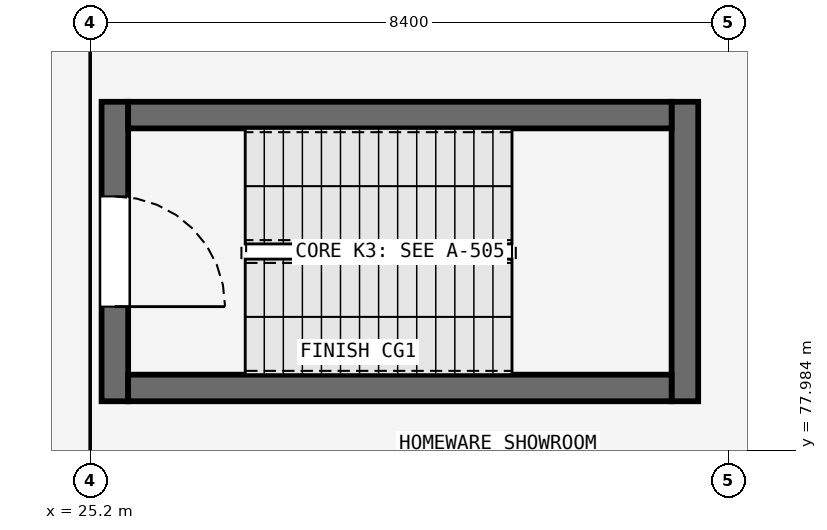
"""IFC4 building model, lengths in metres.
Left out: names, types, materials, properties, quantities, classifications, styles, units other than length and angle.
Written with IfcOpenShell. Run it as: python <this file> out.ifc"""

import sys

from ifc_helpers import new_model, si_unit, direction, frame, frame_2d, origin, place, context, subcontext, project, spatial, rectangle, extrude, element, fill, save


model = new_model("IFC4")
c1 = context("Model", 3, precision=1e-05, world=origin(), true_north=direction((0.0, 1.0)))
c2 = subcontext(c1, "Body", "Model", "MODEL_VIEW")
j1 = project(units=[si_unit("LENGTHUNIT", "METRE"), si_unit("PLANEANGLEUNIT", "RADIAN")], contexts=[c1])
p1 = place(None, origin())
s1 = spatial("IfcSite", under=j1, at=p1, CompositionType="ELEMENT")
p2 = place(p1, origin())
s2 = spatial("IfcBuilding", under=s1, at=p2, CompositionType="ELEMENT")
p3 = place(p2, frame((0.0, 0.0, 18.9)))
s3 = spatial("IfcBuildingStorey", under=s2, at=p3, CompositionType="ELEMENT", Elevation=18.9)
p4 = place(p3, frame((25.525, 82.57, 0.0), z_axis=(0.0, 0.0, 1.0), x_axis=(0.0, -1.0, 0.0)))
e1 = element("IfcWall", 1, at=p4, inside=s3, PredefinedType="SHEAR", context=c2, shape_type="SweptSolid", body=[
    extrude(rectangle(XDim=3.94, YDim=0.35, at=frame_2d((1.97, 0.0))), origin(), (0.0, 0.0, 1.0), 4.2),
])
p5 = place(p4, frame((1.245, 0.0, 0.0)))
e2 = element("IfcOpeningElement", 2, at=p5, cuts=e1, PredefinedType="OPENING", context=c2, shape_type="SweptSolid", body=[
    extrude(rectangle(XDim=1.45, YDim=2.2, at=frame_2d((0.725, 1.1))), frame((0.0, 0.185, 0.0), z_axis=(0.0, -1.0, 0.0), x_axis=(1.0, 0.0, 0.0)), (0.0, 0.0, 1.0), 0.37),
])
p6 = place(p3, frame((33.025, 78.63, 0.0), z_axis=(0.0, 0.0, 1.0), x_axis=(0.0, 1.0, 0.0)))
e3 = element("IfcWall", 3, at=p6, inside=s3, PredefinedType="SHEAR", context=c2, shape_type="SweptSolid", body=[
    extrude(rectangle(XDim=3.94, YDim=0.35, at=frame_2d((1.97, 0.0))), origin(), (0.0, 0.0, 1.0), 4.2),
])
for number, where, z_axis, x_axis in (
    (4, (25.7, 78.805, 0.0), (0.0, 0.0, 1.0), (1.0, 0.0, 0.0)),
    (5, (25.7, 82.395, 0.0), (0.0, 0.0, 1.0), (1.0, 0.0, 0.0)),
):
    element("IfcWall", number, at=place(p3, frame(where, z_axis=z_axis, x_axis=x_axis)), inside=s3, PredefinedType="SHEAR", context=c2, shape_type="SweptSolid", body=[
        extrude(rectangle(XDim=7.15, YDim=0.35, at=frame_2d((3.575, 0.0))), origin(), (0.0, 0.0, 1.0), 4.2),
    ])
p7 = place(p5, origin())
e6 = element("IfcDoor", 6, at=p7, inside=s3, OperationType="SINGLE_SWING_RIGHT", PredefinedType="DOOR", context=c2, shape_type="SweptSolid", body=[
    extrude(rectangle(XDim=1.45, YDim=2.2, at=frame_2d((0.725, 1.1))), frame((0.0, 0.025, 0.0), z_axis=(0.0, -1.0, 0.0), x_axis=(1.0, 0.0, 0.0)), (0.0, 0.0, 1.0), 0.05),
])
fill(e2, e6)
save(model, sys.argv[1])
